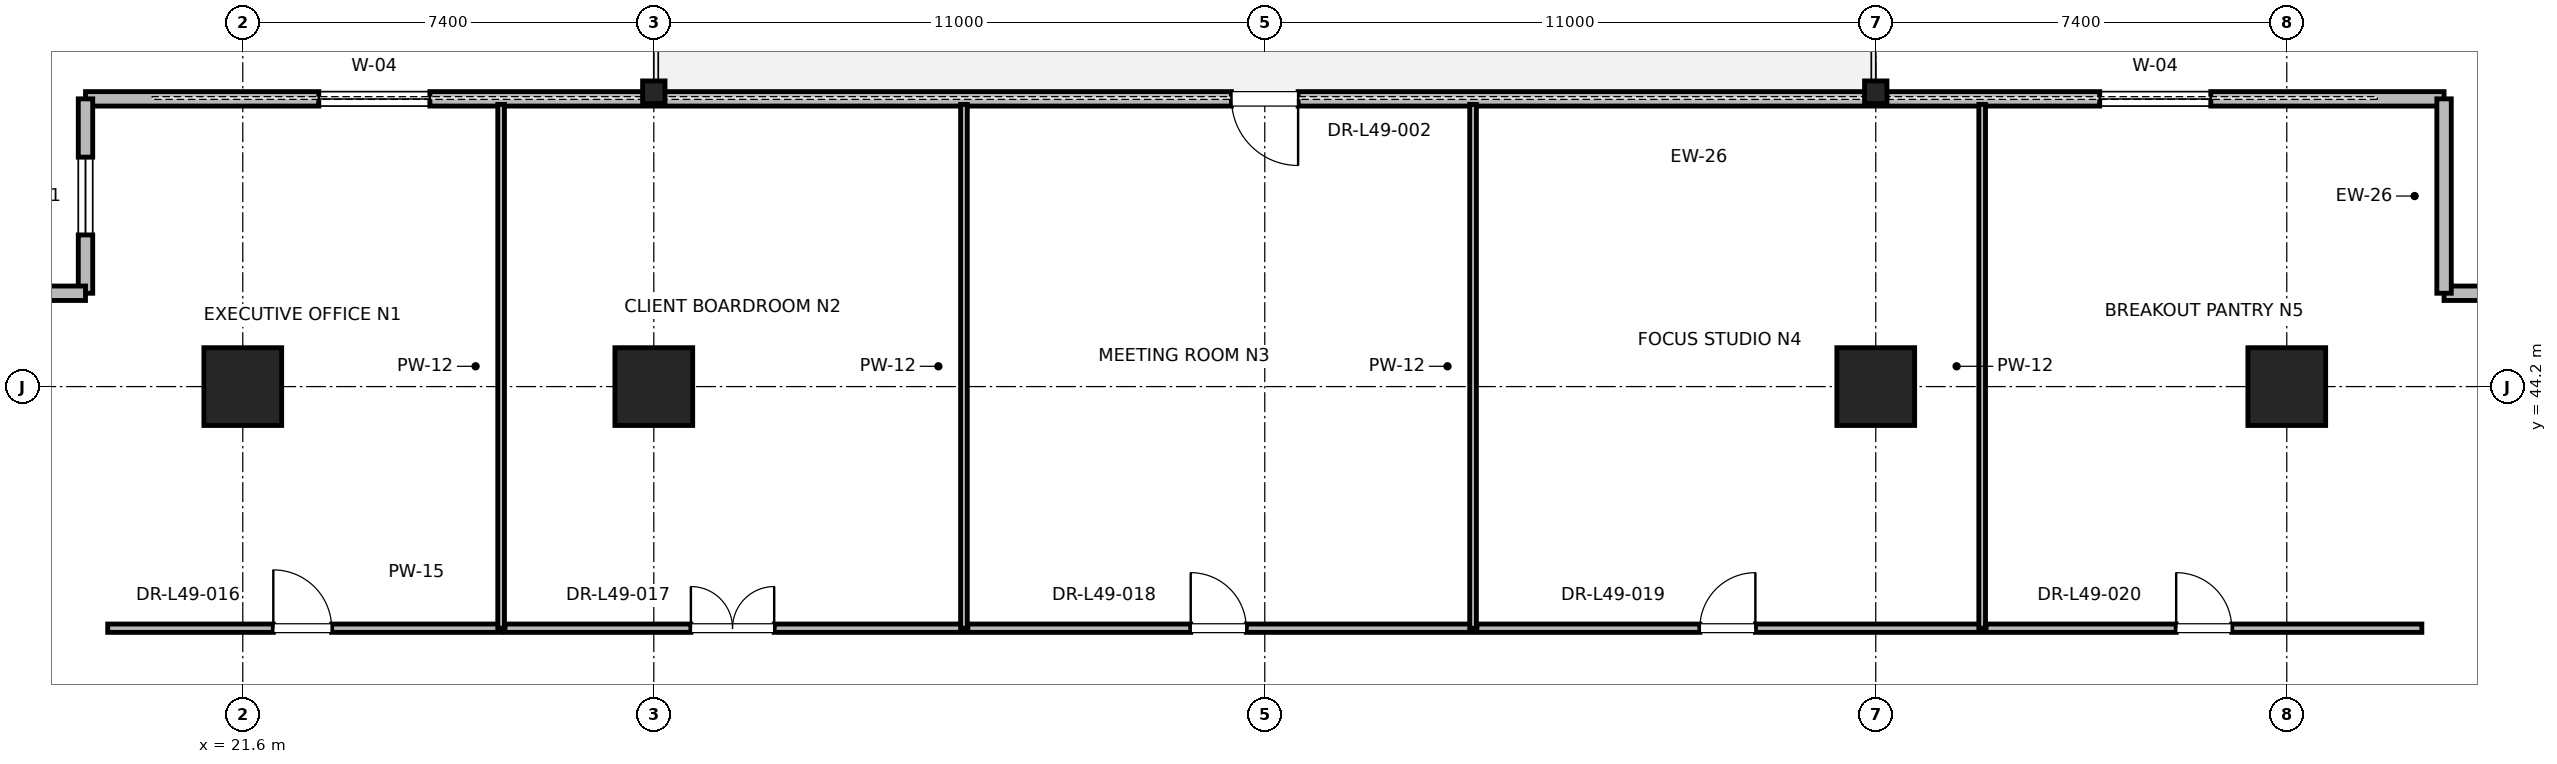
"""IFC4 building model, lengths in metres.
Left out: names, types, materials, properties, quantities, classifications, styles, units other than length and angle.
Written with IfcOpenShell. Run it as: python <this file> out.ifc"""

import sys

from ifc_helpers import new_model, si_unit, direction, frame, frame_2d, origin, origin_2d, place, context, subcontext, project, spatial, rectangle, i_section, extrude, element, fill, save


model = new_model("IFC4")
c1 = context("Model", 3, precision=1e-05, world=origin(), true_north=direction((0.0, 1.0)))
c2 = subcontext(c1, "Body", "Model", "MODEL_VIEW")
j1 = project(units=[si_unit("LENGTHUNIT", "METRE"), si_unit("PLANEANGLEUNIT", "RADIAN")], contexts=[c1])
p1 = place(None, origin())
s1 = spatial("IfcSite", under=j1, at=p1, CompositionType="ELEMENT")
p2 = place(p1, origin())
s2 = spatial("IfcBuilding", under=s1, at=p2, CompositionType="ELEMENT")
p3 = place(p2, frame((0.0, 0.0, 213.2)))
s3 = spatial("IfcBuildingStorey", under=s2, at=p3, CompositionType="ELEMENT", Elevation=213.2)
for number, where, z_axis, x_axis in (
    (1, (29.0, 44.2, 0.0), (0.0, 0.0, 1.0), (1.0, 0.0, 0.0)),
    (2, (51.0, 44.2, 0.0), (0.0, 0.0, 1.0), (1.0, 0.0, 0.0)),
    (3, (21.6, 44.2, 0.0), (0.0, 0.0, 1.0), (1.0, 0.0, 0.0)),
    (4, (58.4, 44.2, 0.0), (0.0, 0.0, 1.0), (1.0, 0.0, 0.0)),
):
    element("IfcColumn", number, at=place(p3, frame(where, z_axis=z_axis, x_axis=x_axis)), inside=s3, PredefinedType="COLUMN", context=c2, shape_type="SweptSolid", body=[
        extrude(rectangle(XDim=1.4, YDim=1.4, at=origin_2d()), origin(), (0.0, 0.0, 1.0), 4.0),
    ])
for number, where, z_axis, x_axis in (
    (5, (29.0, 49.5, 0.0), (0.0, 0.0, 1.0), (1.0, 0.0, 0.0)),
    (6, (51.0, 49.5, 0.0), (0.0, 0.0, 1.0), (1.0, 0.0, 0.0)),
):
    element("IfcColumn", number, at=place(p3, frame(where, z_axis=z_axis, x_axis=x_axis)), inside=s3, PredefinedType="COLUMN", context=c2, shape_type="SweptSolid", body=[
        extrude(i_section(OverallWidth=0.403, OverallDepth=0.406, WebThickness=0.027, FlangeThickness=0.043, FilletRadius=0.015, at=origin_2d()), origin(), (0.0, 0.0, 1.0), 4.0),
    ])
p4 = place(p3, frame((61.232, 49.381, 0.0), z_axis=(0.0, 0.0, 1.0), x_axis=(-1.0, 0.0, 0.0)))
e7 = element("IfcWall", 7, at=p4, inside=s3, PredefinedType="PARAPET", context=c2, shape_type="SweptSolid", body=[
    extrude(rectangle(XDim=42.463, YDim=0.26, at=frame_2d((21.232, 0.0))), origin(), (0.0, 0.0, 1.0), 3.047),
])
p5 = place(p4, frame((4.2, 0.0, 0.85)))
e8 = element("IfcOpeningElement", 8, at=p5, cuts=e7, PredefinedType="OPENING", context=c2, shape_type="SweptSolid", body=[
    extrude(rectangle(XDim=2.0, YDim=2.3, at=frame_2d((1.0, 1.15))), frame((0.0, 0.13, 0.0), z_axis=(0.0, -1.0, 0.0), x_axis=(1.0, 0.0, 0.0)), (0.0, 0.0, 1.0), 0.26),
])
p6 = place(p4, frame((20.632, 0.0, 0.0)))
e9 = element("IfcOpeningElement", 9, at=p6, cuts=e7, PredefinedType="OPENING", context=c2, shape_type="SweptSolid", body=[
    extrude(rectangle(XDim=1.2, YDim=2.2, at=frame_2d((0.6, 1.1))), frame((0.0, 0.13, 0.0), z_axis=(0.0, -1.0, 0.0), x_axis=(1.0, 0.0, 0.0)), (0.0, 0.0, 1.0), 0.26),
])
p7 = place(p4, frame((36.263, 0.0, 0.85)))
e10 = element("IfcOpeningElement", 10, at=p7, cuts=e7, PredefinedType="OPENING", context=c2, shape_type="SweptSolid", body=[
    extrude(rectangle(XDim=2.0, YDim=2.3, at=frame_2d((1.0, 1.15))), frame((0.0, 0.13, 0.0), z_axis=(0.0, -1.0, 0.0), x_axis=(1.0, 0.0, 0.0)), (0.0, 0.0, 1.0), 0.26),
])
p8 = place(p3, frame((65.232, 45.881, 0.0), z_axis=(0.0, 0.0, 1.0), x_axis=(-1.0, 0.0, 0.0)))
e11 = element("IfcWall", 11, at=p8, inside=s3, PredefinedType="PARAPET", context=c2, shape_type="SweptSolid", body=[
    extrude(rectangle(XDim=4.0, YDim=0.26, at=frame_2d((2.0, 0.0))), origin(), (0.0, 0.0, 1.0), 3.775),
])
p9 = place(p8, frame((1.3, 0.0, 0.85)))
e12 = element("IfcOpeningElement", 12, at=p9, cuts=e11, PredefinedType="OPENING", context=c2, shape_type="SweptSolid", body=[
    extrude(rectangle(XDim=1.4, YDim=2.0, at=frame_2d((0.7, 1.0))), frame((0.0, 0.13, 0.0), z_axis=(0.0, -1.0, 0.0), x_axis=(1.0, 0.0, 0.0)), (0.0, 0.0, 1.0), 0.26),
])
p10 = place(p3, frame((61.232, 45.881, 0.0), z_axis=(0.0, 0.0, 1.0), x_axis=(0.0, 1.0, 0.0)))
e13 = element("IfcWall", 13, at=p10, inside=s3, PredefinedType="PARAPET", context=c2, shape_type="SweptSolid", body=[
    extrude(rectangle(XDim=3.5, YDim=0.26, at=frame_2d((1.75, 0.0))), origin(), (0.0, 0.0, 1.0), 3.775),
])
p11 = place(p3, frame((18.768, 49.381, 0.0), z_axis=(0.0, 0.0, 1.0), x_axis=(0.0, -1.0, 0.0)))
e14 = element("IfcWall", 14, at=p11, inside=s3, PredefinedType="PARAPET", context=c2, shape_type="SweptSolid", body=[
    extrude(rectangle(XDim=3.5, YDim=0.26, at=frame_2d((1.75, 0.0))), origin(), (0.0, 0.0, 1.0), 3.775),
])
p12 = place(p11, frame((1.05, 0.0, 0.85)))
e15 = element("IfcOpeningElement", 15, at=p12, cuts=e14, PredefinedType="OPENING", context=c2, shape_type="SweptSolid", body=[
    extrude(rectangle(XDim=1.4, YDim=2.0, at=frame_2d((0.7, 1.0))), frame((0.0, 0.13, 0.0), z_axis=(0.0, -1.0, 0.0), x_axis=(1.0, 0.0, 0.0)), (0.0, 0.0, 1.0), 0.26),
])
p13 = place(p3, frame((18.768, 45.881, 0.0), z_axis=(0.0, 0.0, 1.0), x_axis=(-1.0, 0.0, 0.0)))
e16 = element("IfcWall", 16, at=p13, inside=s3, PredefinedType="PARAPET", context=c2, shape_type="SweptSolid", body=[
    extrude(rectangle(XDim=4.0, YDim=0.26, at=frame_2d((2.0, 0.0))), origin(), (0.0, 0.0, 1.0), 3.775),
])
p14 = place(p3, frame((19.168, 39.85, 0.0), z_axis=(0.0, 0.0, 1.0), x_axis=(1.0, 0.0, 0.0)))
e17 = element("IfcWall", 17, at=p14, inside=s3, PredefinedType="PARTITIONING", context=c2, shape_type="SweptSolid", body=[
    extrude(rectangle(XDim=7.083, YDim=0.15, at=frame_2d((3.542, 0.0))), origin(), (0.0, 0.0, 1.0), 2.85),
])
p15 = place(p14, frame((2.981, 0.0, 0.0)))
e18 = element("IfcOpeningElement", 18, at=p15, cuts=e17, PredefinedType="OPENING", context=c2, shape_type="SweptSolid", body=[
    extrude(rectangle(XDim=1.05, YDim=2.2, at=frame_2d((0.525, 1.1))), frame((0.0, 0.075, 0.0), z_axis=(0.0, -1.0, 0.0), x_axis=(1.0, 0.0, 0.0)), (0.0, 0.0, 1.0), 0.15),
])
p16 = place(p3, frame((26.251, 39.85, 0.0), z_axis=(0.0, 0.0, 1.0), x_axis=(0.0, 1.0, 0.0)))
e19 = element("IfcWall", 19, at=p16, inside=s3, PredefinedType="PARTITIONING", context=c2, shape_type="SweptSolid", body=[
    extrude(rectangle(XDim=9.43, YDim=0.12, at=frame_2d((4.715, 0.0))), origin(), (0.0, 0.0, 1.0), 2.85),
])
p17 = place(p3, frame((26.321, 39.85, 0.0), z_axis=(0.0, 0.0, 1.0), x_axis=(1.0, 0.0, 0.0)))
e20 = element("IfcWall", 20, at=p17, inside=s3, PredefinedType="PARTITIONING", context=c2, shape_type="SweptSolid", body=[
    extrude(rectangle(XDim=8.263, YDim=0.15, at=frame_2d((4.131, 0.0))), origin(), (0.0, 0.0, 1.0), 2.85),
])
p18 = place(p17, frame((3.346, 0.0, 0.0)))
e21 = element("IfcOpeningElement", 21, at=p18, cuts=e20, PredefinedType="OPENING", context=c2, shape_type="SweptSolid", body=[
    extrude(rectangle(XDim=1.5, YDim=2.25, at=frame_2d((0.75, 1.125))), frame((0.0, 0.075, 0.0), z_axis=(0.0, -1.0, 0.0), x_axis=(1.0, 0.0, 0.0)), (0.0, 0.0, 1.0), 0.15),
])
p19 = place(p3, frame((34.584, 39.85, 0.0), z_axis=(0.0, 0.0, 1.0), x_axis=(0.0, 1.0, 0.0)))
e22 = element("IfcWall", 22, at=p19, inside=s3, PredefinedType="PARTITIONING", context=c2, shape_type="SweptSolid", body=[
    extrude(rectangle(XDim=9.43, YDim=0.12, at=frame_2d((4.715, 0.0))), origin(), (0.0, 0.0, 1.0), 2.405),
])
p20 = place(p3, frame((34.654, 39.85, 0.0), z_axis=(0.0, 0.0, 1.0), x_axis=(1.0, 0.0, 0.0)))
e23 = element("IfcWall", 23, at=p20, inside=s3, PredefinedType="PARTITIONING", context=c2, shape_type="SweptSolid", body=[
    extrude(rectangle(XDim=9.096, YDim=0.15, at=frame_2d((4.548, 0.0))), origin(), (0.0, 0.0, 1.0), 2.85),
])
p21 = place(p20, frame((4.013, 0.0, 0.0)))
e24 = element("IfcOpeningElement", 24, at=p21, cuts=e23, PredefinedType="OPENING", context=c2, shape_type="SweptSolid", body=[
    extrude(rectangle(XDim=1.0, YDim=2.15, at=frame_2d((0.5, 1.075))), frame((0.0, 0.075, 0.0), z_axis=(0.0, -1.0, 0.0), x_axis=(1.0, 0.0, 0.0)), (0.0, 0.0, 1.0), 0.15),
])
p22 = place(p3, frame((43.75, 39.85, 0.0), z_axis=(0.0, 0.0, 1.0), x_axis=(0.0, 1.0, 0.0)))
e25 = element("IfcWall", 25, at=p22, inside=s3, PredefinedType="PARTITIONING", context=c2, shape_type="SweptSolid", body=[
    extrude(rectangle(XDim=9.43, YDim=0.12, at=frame_2d((4.715, 0.0))), origin(), (0.0, 0.0, 1.0), 2.405),
])
p23 = place(p3, frame((43.82, 39.85, 0.0), z_axis=(0.0, 0.0, 1.0), x_axis=(1.0, 0.0, 0.0)))
e26 = element("IfcWall", 26, at=p23, inside=s3, PredefinedType="PARTITIONING", context=c2, shape_type="SweptSolid", body=[
    extrude(rectangle(XDim=9.096, YDim=0.15, at=frame_2d((4.548, 0.0))), origin(), (0.0, 0.0, 1.0), 2.85),
])
p24 = place(p23, frame((4.013, 0.0, 0.0)))
e27 = element("IfcOpeningElement", 27, at=p24, cuts=e26, PredefinedType="OPENING", context=c2, shape_type="SweptSolid", body=[
    extrude(rectangle(XDim=1.0, YDim=2.15, at=frame_2d((0.5, 1.075))), frame((0.0, 0.075, 0.0), z_axis=(0.0, -1.0, 0.0), x_axis=(1.0, 0.0, 0.0)), (0.0, 0.0, 1.0), 0.15),
])
p25 = place(p3, frame((52.916, 39.85, 0.0), z_axis=(0.0, 0.0, 1.0), x_axis=(0.0, 1.0, 0.0)))
e28 = element("IfcWall", 28, at=p25, inside=s3, PredefinedType="PARTITIONING", context=c2, shape_type="SweptSolid", body=[
    extrude(rectangle(XDim=9.43, YDim=0.12, at=frame_2d((4.715, 0.0))), origin(), (0.0, 0.0, 1.0), 2.85),
])
p26 = place(p3, frame((52.986, 39.85, 0.0), z_axis=(0.0, 0.0, 1.0), x_axis=(1.0, 0.0, 0.0)))
e29 = element("IfcWall", 29, at=p26, inside=s3, PredefinedType="PARTITIONING", context=c2, shape_type="SweptSolid", body=[
    extrude(rectangle(XDim=7.846, YDim=0.15, at=frame_2d((3.923, 0.0))), origin(), (0.0, 0.0, 1.0), 2.85),
])
p27 = place(p26, frame((3.423, 0.0, 0.0)))
e30 = element("IfcOpeningElement", 30, at=p27, cuts=e29, PredefinedType="OPENING", context=c2, shape_type="SweptSolid", body=[
    extrude(rectangle(XDim=1.0, YDim=2.15, at=frame_2d((0.5, 1.075))), frame((0.0, 0.075, 0.0), z_axis=(0.0, -1.0, 0.0), x_axis=(1.0, 0.0, 0.0)), (0.0, 0.0, 1.0), 0.15),
])
p28 = place(p5, origin())
e31 = element("IfcWindow", 31, at=p28, inside=s3, PartitioningType="SINGLE_PANEL", PredefinedType="WINDOW", context=c2, shape_type="SweptSolid", body=[
    extrude(rectangle(XDim=2.0, YDim=2.3, at=frame_2d((1.0, 1.15))), frame((0.0, 0.03, 0.0), z_axis=(0.0, -1.0, 0.0), x_axis=(1.0, 0.0, 0.0)), (0.0, 0.0, 1.0), 0.06),
])
fill(e8, e31)
p29 = place(p6, origin())
e32 = element("IfcDoor", 32, at=p29, inside=s3, OperationType="SINGLE_SWING_LEFT", PredefinedType="DOOR", context=c2, shape_type="SweptSolid", body=[
    extrude(rectangle(XDim=1.2, YDim=2.2, at=frame_2d((0.6, 1.1))), frame((0.0, 0.025, 0.0), z_axis=(0.0, -1.0, 0.0), x_axis=(1.0, 0.0, 0.0)), (0.0, 0.0, 1.0), 0.05),
])
fill(e9, e32)
p30 = place(p7, origin())
e33 = element("IfcWindow", 33, at=p30, inside=s3, PartitioningType="SINGLE_PANEL", PredefinedType="WINDOW", context=c2, shape_type="SweptSolid", body=[
    extrude(rectangle(XDim=2.0, YDim=2.3, at=frame_2d((1.0, 1.15))), frame((0.0, 0.03, 0.0), z_axis=(0.0, -1.0, 0.0), x_axis=(1.0, 0.0, 0.0)), (0.0, 0.0, 1.0), 0.06),
])
fill(e10, e33)
p31 = place(p12, origin())
e34 = element("IfcWindow", 34, at=p31, inside=s3, PartitioningType="SINGLE_PANEL", PredefinedType="WINDOW", context=c2, shape_type="SweptSolid", body=[
    extrude(rectangle(XDim=1.4, YDim=2.0, at=frame_2d((0.7, 1.0))), frame((0.0, 0.03, 0.0), z_axis=(0.0, -1.0, 0.0), x_axis=(1.0, 0.0, 0.0)), (0.0, 0.0, 1.0), 0.06),
])
fill(e15, e34)
p32 = place(p15, origin())
e35 = element("IfcDoor", 35, at=p32, inside=s3, OperationType="SINGLE_SWING_LEFT", PredefinedType="DOOR", context=c2, shape_type="SweptSolid", body=[
    extrude(rectangle(XDim=1.05, YDim=2.2, at=frame_2d((0.525, 1.1))), frame((0.0, 0.025, 0.0), z_axis=(0.0, -1.0, 0.0), x_axis=(1.0, 0.0, 0.0)), (0.0, 0.0, 1.0), 0.05),
])
fill(e18, e35)
p33 = place(p18, origin())
e36 = element("IfcDoor", 36, at=p33, inside=s3, OperationType="DOUBLE_DOOR_SINGLE_SWING", PredefinedType="DOOR", context=c2, shape_type="SweptSolid", body=[
    extrude(rectangle(XDim=1.5, YDim=2.25, at=frame_2d((0.75, 1.125))), frame((0.0, 0.025, 0.0), z_axis=(0.0, -1.0, 0.0), x_axis=(1.0, 0.0, 0.0)), (0.0, 0.0, 1.0), 0.05),
])
fill(e21, e36)
p34 = place(p21, origin())
e37 = element("IfcDoor", 37, at=p34, inside=s3, OperationType="SINGLE_SWING_LEFT", PredefinedType="DOOR", context=c2, shape_type="SweptSolid", body=[
    extrude(rectangle(XDim=1.0, YDim=2.15, at=frame_2d((0.5, 1.075))), frame((0.0, 0.025, 0.0), z_axis=(0.0, -1.0, 0.0), x_axis=(1.0, 0.0, 0.0)), (0.0, 0.0, 1.0), 0.05),
])
fill(e24, e37)
p35 = place(p24, origin())
e38 = element("IfcDoor", 38, at=p35, inside=s3, OperationType="SINGLE_SWING_RIGHT", PredefinedType="DOOR", context=c2, shape_type="SweptSolid", body=[
    extrude(rectangle(XDim=1.0, YDim=2.15, at=frame_2d((0.5, 1.075))), frame((0.0, 0.025, 0.0), z_axis=(0.0, -1.0, 0.0), x_axis=(1.0, 0.0, 0.0)), (0.0, 0.0, 1.0), 0.05),
])
fill(e27, e38)
p36 = place(p27, origin())
e39 = element("IfcDoor", 39, at=p36, inside=s3, OperationType="SINGLE_SWING_LEFT", PredefinedType="DOOR", context=c2, shape_type="SweptSolid", body=[
    extrude(rectangle(XDim=1.0, YDim=2.15, at=frame_2d((0.5, 1.075))), frame((0.0, 0.025, 0.0), z_axis=(0.0, -1.0, 0.0), x_axis=(1.0, 0.0, 0.0)), (0.0, 0.0, 1.0), 0.05),
])
fill(e30, e39)
save(model, sys.argv[1])
